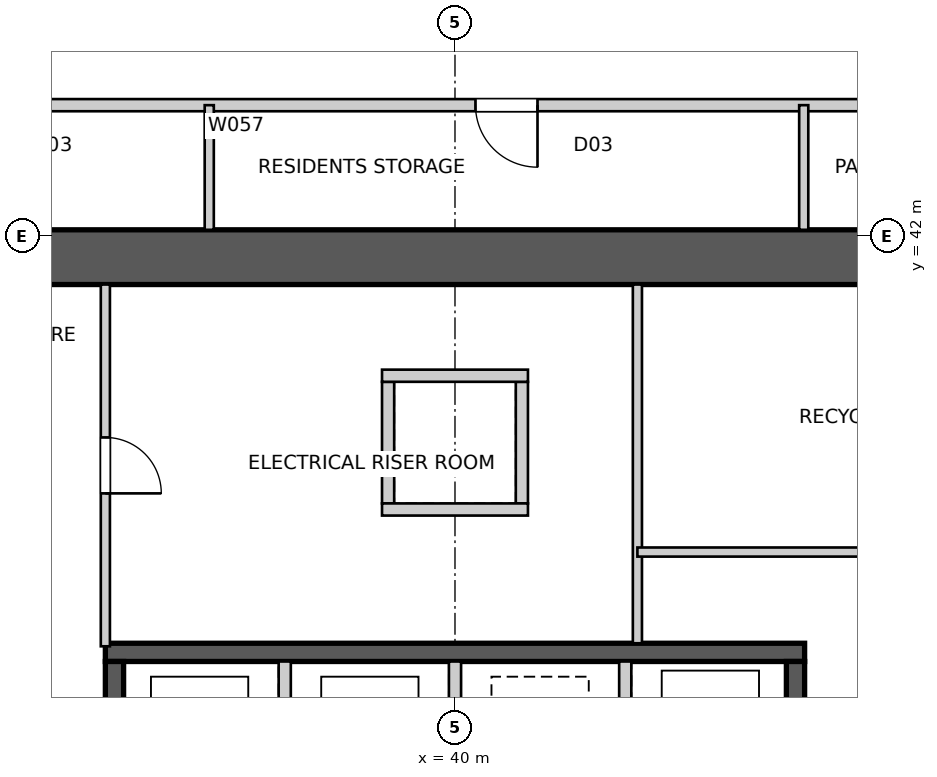
"""IFC4 building model, lengths in metres.
Left out: names, types, materials, properties, quantities, classifications, styles, units other than length and angle.
Written with IfcOpenShell. Run it as: python <this file> out.ifc"""

import sys

from ifc_helpers import new_model, si_unit, direction, frame, frame_2d, origin, place, context, subcontext, project, spatial, polyline, rectangle, outline, extrude, element, fill, save


model = new_model("IFC4")
c1 = context("Model", 3, precision=1e-05, world=origin(), true_north=direction((0.0, 1.0)))
c2 = subcontext(c1, "Body", "Model", "MODEL_VIEW")
j1 = project(units=[si_unit("LENGTHUNIT", "METRE"), si_unit("PLANEANGLEUNIT", "RADIAN")], contexts=[c1])
p1 = place(None, origin())
s1 = spatial("IfcSite", under=j1, at=p1, CompositionType="ELEMENT")
p2 = place(p1, origin())
s2 = spatial("IfcBuilding", under=s1, at=p2, CompositionType="ELEMENT")
p3 = place(p2, frame((0.0, 0.0, 28.6)))
s3 = spatial("IfcBuildingStorey", under=s2, at=p3, CompositionType="ELEMENT", Elevation=28.6)
p4 = place(p3, frame((28.8, 41.65, 0.0), z_axis=(0.0, 0.0, 1.0), x_axis=(1.0, 0.0, 0.0)))
e1 = element("IfcWall", 1, at=p4, inside=s3, PredefinedType="SHEAR", context=c2, shape_type="SweptSolid", body=[
    extrude(outline(polyline([(0.0, -0.45), (22.4, -0.45), (22.4, -0.025), (22.85, -0.025), (22.85, 0.025), (22.4, 0.025), (22.4, 0.45), (0.0, 0.45), (0.0, 0.025), (-0.45, 0.025), (-0.45, -0.025), (0.0, -0.025), (0.0, -0.45)])), origin(), (0.0, 0.0, 1.0), 3.4),
])
p5 = place(p3, frame((34.25, 35.15, 0.0), z_axis=(0.0, 0.0, 1.0), x_axis=(1.0, 0.0, 0.0)))
e2 = element("IfcWall", 2, at=p5, inside=s3, PredefinedType="SHEAR", context=c2, shape_type="SweptSolid", body=[
    extrude(rectangle(XDim=11.5, YDim=0.3, at=frame_2d((5.75, 0.0))), origin(), (0.0, 0.0, 1.0), 3.4),
])
p6 = place(p3, frame((34.4, 32.2, 0.0), z_axis=(0.0, 0.0, 1.0), x_axis=(0.0, 1.0, 0.0)))
e3 = element("IfcWall", 3, at=p6, inside=s3, PredefinedType="SHEAR", context=c2, shape_type="SweptSolid", body=[
    extrude(rectangle(XDim=2.8, YDim=0.3, at=frame_2d((1.4, 0.0))), origin(), (0.0, 0.0, 1.0), 3.4),
])
for number, where, z_axis, x_axis in (
    (4, (37.2, 32.2, 0.0), (0.0, 0.0, 1.0), (0.0, 1.0, 0.0)),
    (5, (40.0, 32.2, 0.0), (0.0, 0.0, 1.0), (0.0, 1.0, 0.0)),
    (6, (42.8, 32.2, 0.0), (0.0, 0.0, 1.0), (0.0, 1.0, 0.0)),
):
    element("IfcWall", number, at=place(p3, frame(where, z_axis=z_axis, x_axis=x_axis)), inside=s3, PredefinedType="SOLIDWALL", context=c2, shape_type="SweptSolid", body=[
        extrude(rectangle(XDim=2.8, YDim=0.2, at=frame_2d((1.4, 0.0))), origin(), (0.0, 0.0, 1.0), 3.4),
    ])
p7 = place(p3, frame((45.6, 32.2, 0.0), z_axis=(0.0, 0.0, 1.0), x_axis=(0.0, 1.0, 0.0)))
e7 = element("IfcWall", 7, at=p7, inside=s3, PredefinedType="SHEAR", context=c2, shape_type="SweptSolid", body=[
    extrude(rectangle(XDim=2.8, YDim=0.3, at=frame_2d((1.4, 0.0))), origin(), (0.0, 0.0, 1.0), 3.4),
])
for number, where, z_axis, x_axis in (
    (8, (38.9, 37.6, 0.0), (0.0, 0.0, 1.0), (0.0, 1.0, 0.0)),
    (9, (41.1, 37.6, 0.0), (0.0, 0.0, 1.0), (0.0, 1.0, 0.0)),
):
    element("IfcWall", number, at=place(p3, frame(where, z_axis=z_axis, x_axis=x_axis)), inside=s3, PredefinedType="SOLIDWALL", context=c2, shape_type="SweptSolid", body=[
        extrude(rectangle(XDim=2.0, YDim=0.2, at=frame_2d((1.0, 0.0))), origin(), (0.0, 0.0, 1.0), 3.4),
    ])
for number, where, z_axis, x_axis in (
    (10, (38.8, 37.5, 0.0), (0.0, 0.0, 1.0), (1.0, 0.0, 0.0)),
    (11, (38.8, 39.7, 0.0), (0.0, 0.0, 1.0), (1.0, 0.0, 0.0)),
):
    element("IfcWall", number, at=place(p3, frame(where, z_axis=z_axis, x_axis=x_axis)), inside=s3, PredefinedType="SOLIDWALL", context=c2, shape_type="SweptSolid", body=[
        extrude(rectangle(XDim=2.4, YDim=0.2, at=frame_2d((1.2, 0.0))), origin(), (0.0, 0.0, 1.0), 3.4),
    ])
p8 = place(p3, frame((34.25, 41.2, 0.0), z_axis=(0.0, 0.0, 1.0), x_axis=(0.0, -1.0, 0.0)))
e12 = element("IfcWall", 12, at=p8, inside=s3, PredefinedType="SOLIDWALL", context=c2, shape_type="SweptSolid", body=[
    extrude(rectangle(XDim=5.95, YDim=0.15, at=frame_2d((2.975, 0.0))), origin(), (0.0, 0.0, 1.0), 3.25),
])
p9 = place(p8, frame((2.515, 0.0, 0.0)))
e13 = element("IfcOpeningElement", 13, at=p9, cuts=e12, PredefinedType="OPENING", context=c2, shape_type="SweptSolid", body=[
    extrude(rectangle(XDim=0.92, YDim=2.1, at=frame_2d((0.46, 1.05))), frame((0.0, 0.085, 0.0), z_axis=(0.0, -1.0, 0.0), x_axis=(1.0, 0.0, 0.0)), (0.0, 0.0, 1.0), 0.17),
])
p10 = place(p3, frame((43.0, 41.2, 0.0), z_axis=(0.0, 0.0, 1.0), x_axis=(0.0, -1.0, 0.0)))
e14 = element("IfcWall", 14, at=p10, inside=s3, PredefinedType="SOLIDWALL", context=c2, shape_type="SweptSolid", body=[
    extrude(rectangle(XDim=5.9, YDim=0.15, at=frame_2d((2.95, 0.0))), origin(), (0.0, 0.0, 1.0), 3.25),
])
p11 = place(p3, frame((43.0, 36.8, 0.0), z_axis=(0.0, 0.0, 1.0), x_axis=(1.0, 0.0, 0.0)))
e15 = element("IfcWall", 15, at=p11, inside=s3, PredefinedType="SOLIDWALL", context=c2, shape_type="SweptSolid", body=[
    extrude(rectangle(XDim=8.2, YDim=0.15, at=frame_2d((4.1, 0.0))), origin(), (0.0, 0.0, 1.0), 3.25),
])
p12 = place(p11, frame((3.64, 0.0, 0.0)))
e16 = element("IfcOpeningElement", 16, at=p12, cuts=e15, PredefinedType="OPENING", context=c2, shape_type="SweptSolid", body=[
    extrude(rectangle(XDim=0.92, YDim=2.1, at=frame_2d((0.46, 1.05))), frame((0.0, 0.085, 0.0), z_axis=(0.0, -1.0, 0.0), x_axis=(1.0, 0.0, 0.0)), (0.0, 0.0, 1.0), 0.17),
])
p13 = place(p3, frame((52.1, 44.15, 0.0), z_axis=(0.0, 0.0, 1.0), x_axis=(-1.0, 0.0, 0.0)))
e17 = element("IfcWall", 17, at=p13, inside=s3, PredefinedType="PARTITIONING", context=c2, shape_type="SweptSolid", body=[
    extrude(rectangle(XDim=24.2, YDim=0.2, at=frame_2d((12.1, 0.0))), origin(), (0.0, 0.0, 1.0), 3.25),
])
p14 = place(p13, frame((10.743, 0.0, 0.0)))
e18 = element("IfcOpeningElement", 18, at=p14, cuts=e17, PredefinedType="OPENING", context=c2, shape_type="SweptSolid", body=[
    extrude(rectangle(XDim=1.02, YDim=2.1, at=frame_2d((0.51, 1.05))), frame((0.0, 0.11, 0.0), z_axis=(0.0, -1.0, 0.0), x_axis=(1.0, 0.0, 0.0)), (0.0, 0.0, 1.0), 0.22),
])
p15 = place(p13, frame((19.636, 0.0, 0.0)))
e19 = element("IfcOpeningElement", 19, at=p15, cuts=e17, PredefinedType="OPENING", context=c2, shape_type="SweptSolid", body=[
    extrude(rectangle(XDim=1.02, YDim=2.1, at=frame_2d((0.51, 1.05))), frame((0.0, 0.11, 0.0), z_axis=(0.0, -1.0, 0.0), x_axis=(1.0, 0.0, 0.0)), (0.0, 0.0, 1.0), 0.22),
])
p16 = place(p13, frame((3.447, 0.0, 0.0)))
e20 = element("IfcOpeningElement", 20, at=p16, cuts=e17, PredefinedType="OPENING", context=c2, shape_type="SweptSolid", body=[
    extrude(rectangle(XDim=1.02, YDim=2.1, at=frame_2d((0.51, 1.05))), frame((0.0, 0.11, 0.0), z_axis=(0.0, -1.0, 0.0), x_axis=(1.0, 0.0, 0.0)), (0.0, 0.0, 1.0), 0.22),
])
p17 = place(p3, frame((35.958, 42.1, 0.0), z_axis=(0.0, 0.0, 1.0), x_axis=(0.0, 1.0, 0.0)))
e21 = element("IfcWall", 21, at=p17, inside=s3, PredefinedType="SOLIDWALL", context=c2, shape_type="SweptSolid", body=[
    extrude(rectangle(XDim=2.05, YDim=0.15, at=frame_2d((1.025, 0.0))), origin(), (0.0, 0.0, 1.0), 3.25),
])
p18 = place(p3, frame((45.735, 42.1, 0.0), z_axis=(0.0, 0.0, 1.0), x_axis=(0.0, 1.0, 0.0)))
e22 = element("IfcWall", 22, at=p18, inside=s3, PredefinedType="SOLIDWALL", context=c2, shape_type="SweptSolid", body=[
    extrude(rectangle(XDim=2.05, YDim=0.15, at=frame_2d((1.025, 0.0))), origin(), (0.0, 0.0, 1.0), 2.796),
])
p19 = place(p14, origin())
e23 = element("IfcDoor", 23, at=p19, inside=s3, OperationType="SINGLE_SWING_LEFT", PredefinedType="DOOR", context=c2, shape_type="SweptSolid", body=[
    extrude(rectangle(XDim=1.02, YDim=2.1, at=frame_2d((0.51, 1.05))), frame((0.0, 0.025, 0.0), z_axis=(0.0, -1.0, 0.0), x_axis=(1.0, 0.0, 0.0)), (0.0, 0.0, 1.0), 0.05),
])
fill(e18, e23)
p20 = place(p9, origin())
e24 = element("IfcDoor", 24, at=p20, inside=s3, OperationType="SINGLE_SWING_RIGHT", PredefinedType="DOOR", context=c2, shape_type="SweptSolid", body=[
    extrude(rectangle(XDim=0.92, YDim=2.1, at=frame_2d((0.46, 1.05))), frame((0.0, 0.025, 0.0), z_axis=(0.0, -1.0, 0.0), x_axis=(1.0, 0.0, 0.0)), (0.0, 0.0, 1.0), 0.05),
])
fill(e13, e24)
save(model, sys.argv[1])
